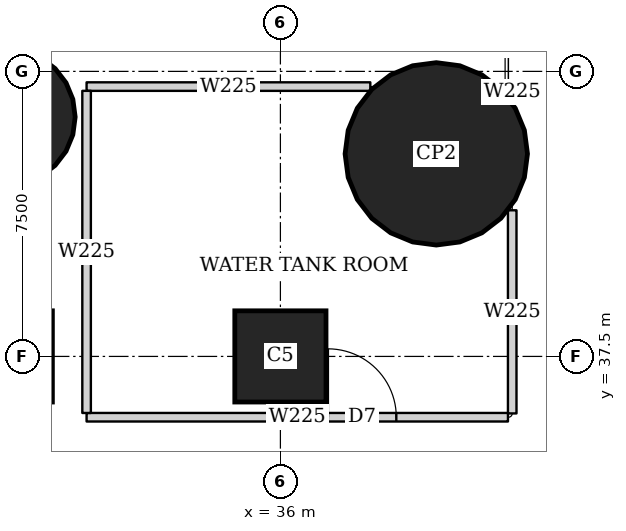
"""IFC4 building model, lengths in metres.
Left out: names, types, materials, properties, quantities, classifications, styles, units other than length and angle.
Written with IfcOpenShell. Run it as: python <this file> out.ifc"""

import sys

from ifc_helpers import new_model, si_unit, direction, frame, frame_2d, origin, origin_2d, place, context, subcontext, project, spatial, rectangle, circle, extrude, element, fill, save


model = new_model("IFC4")
c1 = context("Model", 3, precision=1e-05, world=origin(), true_north=direction((0.0, 1.0)))
c2 = subcontext(c1, "Body", "Model", "MODEL_VIEW")
j1 = project(units=[si_unit("LENGTHUNIT", "METRE"), si_unit("PLANEANGLEUNIT", "RADIAN")], contexts=[c1])
p1 = place(None, origin())
s1 = spatial("IfcSite", under=j1, at=p1, CompositionType="ELEMENT")
p2 = place(p1, origin())
s2 = spatial("IfcBuilding", under=s1, at=p2, CompositionType="ELEMENT")
p3 = place(p2, frame((0.0, 0.0, -8.0)))
s3 = spatial("IfcBuildingStorey", under=s2, at=p3, CompositionType="ELEMENT", Elevation=-8.0)
p4 = place(p3, frame((36.0, 37.5, -0.4), z_axis=(0.0, 0.0, 1.0), x_axis=(1.0, 0.0, 0.0)))
e1 = element("IfcColumn", 1, at=p4, inside=s3, PredefinedType="COLUMN", context=c2, shape_type="SweptSolid", body=[
    extrude(rectangle(XDim=2.4, YDim=2.4, at=origin_2d()), origin(), (0.0, 0.0, 1.0), 4.4),
])
p5 = place(p3, frame((40.102, 42.83, -1.0), z_axis=(0.0, 0.0, 1.0), x_axis=(1.0, 0.0, 0.0)))
e2 = element("IfcColumn", 2, at=p5, inside=s3, PredefinedType="COLUMN", context=c2, shape_type="SweptSolid", body=[
    extrude(circle(Radius=2.4, at=origin_2d()), origin(), (0.0, 0.0, 1.0), 5.0),
])
p6 = place(p3, frame((28.8, 43.8, -0.4), z_axis=(0.0, 0.0, 1.0), x_axis=(1.0, 0.0, 0.0)))
e3 = element("IfcColumn", 3, at=p6, inside=s3, PredefinedType="COLUMN", context=c2, shape_type="SweptSolid", body=[
    extrude(circle(Radius=1.8, at=origin_2d()), origin(), (0.0, 0.0, 1.0), 4.4),
])
p7 = place(p3, frame((30.9, 35.9, 0.0), z_axis=(0.0, 0.0, 1.0), x_axis=(1.0, 0.0, 0.0)))
e4 = element("IfcWall", 4, at=p7, inside=s3, PredefinedType="SOLIDWALL", context=c2, shape_type="SweptSolid", body=[
    extrude(rectangle(XDim=11.088, YDim=0.225, at=frame_2d((5.544, 0.0))), origin(), (0.0, 0.0, 1.0), 2.55),
])
p8 = place(p7, frame((6.35, 0.0, 0.0)))
e5 = element("IfcOpeningElement", 5, at=p8, cuts=e4, PredefinedType="OPENING", context=c2, shape_type="SweptSolid", body=[
    extrude(rectangle(XDim=1.8, YDim=2.4, at=frame_2d((0.9, 1.2))), frame((0.0, 0.123, 0.0), z_axis=(0.0, -1.0, 0.0), x_axis=(1.0, 0.0, 0.0)), (0.0, 0.0, 1.0), 0.245),
])
p9 = place(p3, frame((30.9, 36.012, 0.0), z_axis=(0.0, 0.0, 1.0), x_axis=(0.0, 1.0, 0.0)))
e6 = element("IfcWall", 6, at=p9, inside=s3, PredefinedType="SOLIDWALL", context=c2, shape_type="SweptSolid", body=[
    extrude(rectangle(XDim=8.476, YDim=0.225, at=frame_2d((4.238, 0.0))), origin(), (0.0, 0.0, 1.0), 2.55),
])
p10 = place(p3, frame((42.1, 36.0, 0.0), z_axis=(0.0, 0.0, 1.0), x_axis=(0.0, 1.0, 0.0)))
e7 = element("IfcWall", 7, at=p10, inside=s3, PredefinedType="SOLIDWALL", context=c2, shape_type="SweptSolid", body=[
    extrude(rectangle(XDim=5.345, YDim=0.225, at=frame_2d((2.672, 0.0))), origin(), (0.0, 0.0, 1.0), 2.55),
])
p11 = place(p3, frame((42.1, 44.315, 0.0), z_axis=(0.0, 0.0, 1.0), x_axis=(0.0, 1.0, 0.0)))
e8 = element("IfcWall", 8, at=p11, inside=s3, PredefinedType="SOLIDWALL", context=c2, shape_type="SweptSolid", body=[
    extrude(rectangle(XDim=0.285, YDim=0.225, at=frame_2d((0.143, 0.0))), origin(), (0.0, 0.0, 1.0), 3.55),
])
p12 = place(p3, frame((30.9, 44.6, 0.0), z_axis=(0.0, 0.0, 1.0), x_axis=(1.0, 0.0, 0.0)))
e9 = element("IfcWall", 9, at=p12, inside=s3, PredefinedType="SOLIDWALL", context=c2, shape_type="SweptSolid", body=[
    extrude(rectangle(XDim=7.466, YDim=0.225, at=frame_2d((3.733, 0.0))), origin(), (0.0, 0.0, 1.0), 3.55),
])
p13 = place(p3, frame((41.838, 44.6, 0.0), z_axis=(0.0, 0.0, 1.0), x_axis=(1.0, 0.0, 0.0)))
e10 = element("IfcWall", 10, at=p13, inside=s3, PredefinedType="SOLIDWALL", context=c2, shape_type="SweptSolid", body=[
    extrude(rectangle(XDim=0.15, YDim=0.225, at=frame_2d((0.075, 0.0))), origin(), (0.0, 0.0, 1.0), 3.55),
])
p14 = place(p8, origin())
e11 = element("IfcDoor", 11, at=p14, inside=s3, OperationType="DOUBLE_DOOR_SINGLE_SWING", PredefinedType="DOOR", context=c2, shape_type="SweptSolid", body=[
    extrude(rectangle(XDim=1.8, YDim=2.4, at=frame_2d((0.9, 1.2))), frame((0.0, 0.025, 0.0), z_axis=(0.0, -1.0, 0.0), x_axis=(1.0, 0.0, 0.0)), (0.0, 0.0, 1.0), 0.05),
])
fill(e5, e11)
save(model, sys.argv[1])
